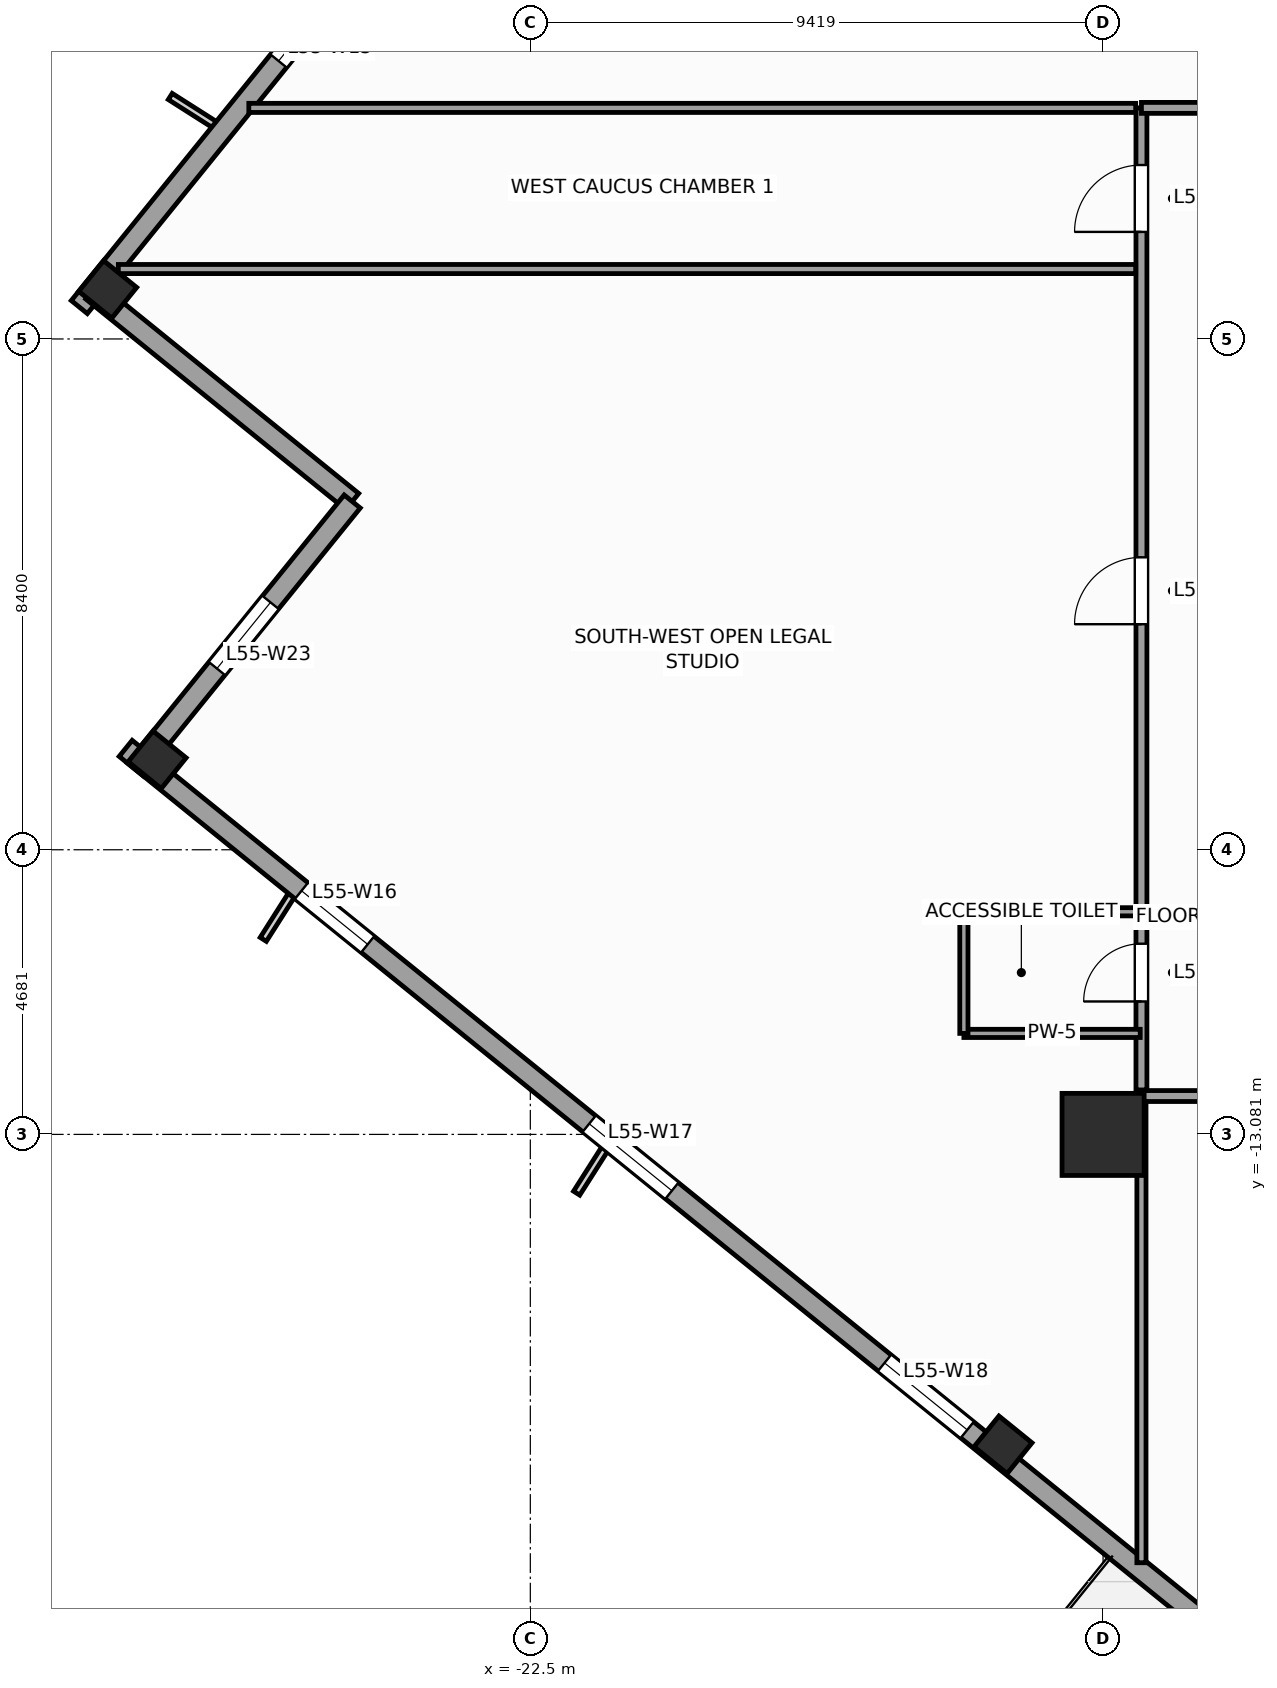
"""IFC4 building model, lengths in metres.
Left out: names, types, materials, properties, quantities, classifications, styles, units other than length and angle.
Written with IfcOpenShell. Run it as: python <this file> out.ifc"""

import sys

from ifc_helpers import new_model, si_unit, direction, frame, frame_2d, origin, origin_2d, place, context, subcontext, project, spatial, rectangle, extrude, source, transform, mapped, element, fill, save


model = new_model("IFC4")
c1 = context("Model", 3, precision=1e-05, world=origin(), true_north=direction((0.0, 1.0)))
c2 = subcontext(c1, "Body", "Model", "MODEL_VIEW")
j1 = project(units=[si_unit("LENGTHUNIT", "METRE"), si_unit("PLANEANGLEUNIT", "RADIAN")], contexts=[c1])
p1 = place(None, origin())
s1 = spatial("IfcSite", under=j1, at=p1, CompositionType="ELEMENT")
p2 = place(p1, origin())
s2 = spatial("IfcBuilding", under=s1, at=p2, CompositionType="ELEMENT")
p3 = place(p2, frame((0.0, 0.0, 229.0)))
s3 = spatial("IfcBuildingStorey", under=s2, at=p3, CompositionType="ELEMENT", Elevation=229.0)
m1 = source(origin(), c2, "Body", "SweptSolid", [
    extrude(rectangle(XDim=1.35, YDim=1.35, at=origin_2d()), origin(), (0.0, 0.0, 1.0), 3.9),
])
p4 = place(p3, frame((-13.081, -13.081, 0.0), z_axis=(0.0, 0.0, 1.0), x_axis=(1.0, 0.0, 0.0)))
e1 = element("IfcColumn", 1, at=p4, inside=s3, PredefinedType="COLUMN", context=c2, shape_type="MappedRepresentation", body=[
    mapped(m1, transform((0.0, 0.0, 0.0), scale=1.0)),
])
m2 = source(origin(), c2, "Body", "SweptSolid", [
    extrude(rectangle(XDim=0.65, YDim=0.7, at=origin_2d()), origin(), (0.0, 0.0, 1.0), 3.9),
])
for number, where, z_axis, x_axis in (
    (2, (-29.45, 0.815, 0.0), (0.0, 0.0, 1.0), (0.629, 0.777, 0.0)),
    (3, (-28.637, -6.92, 0.0), (0.0, 0.0, 1.0), (0.629, 0.777, 0.0)),
    (4, (-14.726, -18.185, 0.0), (0.0, 0.0, 1.0), (0.629, 0.777, 0.0)),
):
    element("IfcColumn", number, at=place(p3, frame(where, z_axis=z_axis, x_axis=x_axis)), inside=s3, PredefinedType="COLUMN", context=c2, shape_type="MappedRepresentation", body=[
        mapped(m2, transform((0.0, 0.0, 0.0), scale=1.0)),
    ])
p5 = place(p3, frame((-6.733, 29.154, 0.0), z_axis=(0.0, 0.0, 1.0), x_axis=(-0.629325378072, -0.77714192302, 0.0)))
e5 = element("IfcWall", 5, at=p5, inside=s3, PredefinedType="STANDARD", context=c2, shape_type="SweptSolid", body=[
    extrude(rectangle(XDim=36.84, YDim=0.34, at=frame_2d((18.42, 0.0))), origin(), (0.0, 0.0, 1.0), 2.96),
])
p6 = place(p5, frame((3.721, 0.0, 0.48)))
e6 = element("IfcOpeningElement", 6, at=p6, cuts=e5, PredefinedType="OPENING", context=c2, shape_type="SweptSolid", body=[
    extrude(rectangle(XDim=1.4, YDim=2.4, at=frame_2d((0.7, 1.2))), frame((0.0, 0.18, 0.0), z_axis=(0.0, -1.0, 0.0), x_axis=(1.0, 0.0, 0.0)), (0.0, 0.0, 1.0), 0.36),
])
p7 = place(p5, frame((9.809, 0.0, 0.58)))
e7 = element("IfcOpeningElement", 7, at=p7, cuts=e5, PredefinedType="OPENING", context=c2, shape_type="SweptSolid", body=[
    extrude(rectangle(XDim=1.75, YDim=2.3, at=frame_2d((0.875, 1.15))), frame((0.0, 0.18, 0.0), z_axis=(0.0, -1.0, 0.0), x_axis=(1.0, 0.0, 0.0)), (0.0, 0.0, 1.0), 0.36),
])
p8 = place(p5, frame((16.058, 0.0, 0.58)))
e8 = element("IfcOpeningElement", 8, at=p8, cuts=e5, PredefinedType="OPENING", context=c2, shape_type="SweptSolid", body=[
    extrude(rectangle(XDim=1.75, YDim=2.3, at=frame_2d((0.875, 1.15))), frame((0.0, 0.18, 0.0), z_axis=(0.0, -1.0, 0.0), x_axis=(1.0, 0.0, 0.0)), (0.0, 0.0, 1.0), 0.36),
])
p9 = place(p5, frame((24.176, 0.0, 0.58)))
e9 = element("IfcOpeningElement", 9, at=p9, cuts=e5, PredefinedType="OPENING", context=c2, shape_type="SweptSolid", body=[
    extrude(rectangle(XDim=1.75, YDim=2.3, at=frame_2d((0.875, 1.15))), frame((0.0, 0.18, 0.0), z_axis=(0.0, -1.0, 0.0), x_axis=(1.0, 0.0, 0.0)), (0.0, 0.0, 1.0), 0.36),
])
p10 = place(p5, frame((30.232, 0.0, 0.48)))
e10 = element("IfcOpeningElement", 10, at=p10, cuts=e5, PredefinedType="OPENING", context=c2, shape_type="SweptSolid", body=[
    extrude(rectangle(XDim=1.4, YDim=2.4, at=frame_2d((0.7, 1.2))), frame((0.0, 0.18, 0.0), z_axis=(0.0, -1.0, 0.0), x_axis=(1.0, 0.0, 0.0)), (0.0, 0.0, 1.0), 0.36),
])
p11 = place(p3, frame((-29.703, 0.789, 0.0), z_axis=(0.0, 0.0, 1.0), x_axis=(0.77714355312, -0.629323365087, 0.0)))
e11 = element("IfcWall", 11, at=p11, inside=s3, PredefinedType="STANDARD", context=c2, shape_type="SweptSolid", body=[
    extrude(rectangle(XDim=5.5, YDim=0.34, at=frame_2d((2.75, 0.0))), origin(), (0.0, 0.0, 1.0), 3.66),
])
p12 = place(p3, frame((-25.429, -2.673, 0.0), z_axis=(0.0, 0.0, 1.0), x_axis=(-0.629299794138, -0.777162640055, 0.0)))
e12 = element("IfcWall", 12, at=p12, inside=s3, PredefinedType="STANDARD", context=c2, shape_type="SweptSolid", body=[
    extrude(rectangle(XDim=5.67, YDim=0.34, at=frame_2d((2.835, 0.0))), origin(), (0.0, 0.0, 1.0), 3.66),
])
p13 = place(p12, frame((2.135, 0.0, 0.48)))
e13 = element("IfcOpeningElement", 13, at=p13, cuts=e12, PredefinedType="OPENING", context=c2, shape_type="SweptSolid", body=[
    extrude(rectangle(XDim=1.4, YDim=2.4, at=frame_2d((0.7, 1.2))), frame((0.0, 0.18, 0.0), z_axis=(0.0, -1.0, 0.0), x_axis=(1.0, 0.0, 0.0)), (0.0, 0.0, 1.0), 0.36),
])
p14 = place(p3, frame((-29.154, -6.733, 0.0), z_axis=(0.0, 0.0, 1.0), x_axis=(0.77714192302, -0.629325378072, 0.0)))
e14 = element("IfcWall", 14, at=p14, inside=s3, PredefinedType="STANDARD", context=c2, shape_type="SweptSolid", body=[
    extrude(rectangle(XDim=36.84, YDim=0.34, at=frame_2d((18.42, 0.0))), origin(), (0.0, 0.0, 1.0), 2.96),
])
p15 = place(p14, frame((23.495, 0.0, 0.0)))
e15 = element("IfcOpeningElement", 15, at=p15, cuts=e14, PredefinedType="OPENING", context=c2, shape_type="SweptSolid", body=[
    extrude(rectangle(XDim=1.05, YDim=2.25, at=frame_2d((0.525, 1.125))), frame((0.0, 0.18, 0.0), z_axis=(0.0, -1.0, 0.0), x_axis=(1.0, 0.0, 0.0)), (0.0, 0.0, 1.0), 0.36),
])
p16 = place(p14, frame((3.721, 0.0, 0.48)))
e16 = element("IfcOpeningElement", 16, at=p16, cuts=e14, PredefinedType="OPENING", context=c2, shape_type="SweptSolid", body=[
    extrude(rectangle(XDim=1.4, YDim=2.4, at=frame_2d((0.7, 1.2))), frame((0.0, 0.18, 0.0), z_axis=(0.0, -1.0, 0.0), x_axis=(1.0, 0.0, 0.0)), (0.0, 0.0, 1.0), 0.36),
])
p17 = place(p14, frame((9.809, 0.0, 0.58)))
e17 = element("IfcOpeningElement", 17, at=p17, cuts=e14, PredefinedType="OPENING", context=c2, shape_type="SweptSolid", body=[
    extrude(rectangle(XDim=1.75, YDim=2.3, at=frame_2d((0.875, 1.15))), frame((0.0, 0.18, 0.0), z_axis=(0.0, -1.0, 0.0), x_axis=(1.0, 0.0, 0.0)), (0.0, 0.0, 1.0), 0.36),
])
p18 = place(p14, frame((16.058, 0.0, 0.58)))
e18 = element("IfcOpeningElement", 18, at=p18, cuts=e14, PredefinedType="OPENING", context=c2, shape_type="SweptSolid", body=[
    extrude(rectangle(XDim=1.75, YDim=2.3, at=frame_2d((0.875, 1.15))), frame((0.0, 0.18, 0.0), z_axis=(0.0, -1.0, 0.0), x_axis=(1.0, 0.0, 0.0)), (0.0, 0.0, 1.0), 0.36),
])
p19 = place(p14, frame((25.676, 0.0, 0.58)))
e19 = element("IfcOpeningElement", 19, at=p19, cuts=e14, PredefinedType="OPENING", context=c2, shape_type="SweptSolid", body=[
    extrude(rectangle(XDim=1.75, YDim=2.3, at=frame_2d((0.875, 1.15))), frame((0.0, 0.18, 0.0), z_axis=(0.0, -1.0, 0.0), x_axis=(1.0, 0.0, 0.0)), (0.0, 0.0, 1.0), 0.36),
])
p20 = place(p14, frame((30.982, 0.0, 0.48)))
e20 = element("IfcOpeningElement", 20, at=p20, cuts=e14, PredefinedType="OPENING", context=c2, shape_type="SweptSolid", body=[
    extrude(rectangle(XDim=1.4, YDim=2.4, at=frame_2d((0.7, 1.2))), frame((0.0, 0.18, 0.0), z_axis=(0.0, -1.0, 0.0), x_axis=(1.0, 0.0, 0.0)), (0.0, 0.0, 1.0), 0.36),
])
p21 = place(p3, frame((-12.45, -12.45, 0.0), z_axis=(0.0, 0.0, 1.0), x_axis=(1.0, 0.0, 0.0)))
e21 = element("IfcWall", 21, at=p21, inside=s3, PredefinedType="PARTITIONING", context=c2, shape_type="SweptSolid", body=[
    extrude(rectangle(XDim=24.9, YDim=0.18, at=frame_2d((12.45, 0.0))), origin(), (0.0, 0.0, 1.0), 3.66),
])
p22 = place(p21, frame((4.839, 0.0, 0.0)))
e22 = element("IfcOpeningElement", 22, at=p22, cuts=e21, PredefinedType="OPENING", context=c2, shape_type="SweptSolid", body=[
    extrude(rectangle(XDim=1.1, YDim=2.2, at=frame_2d((0.55, 1.1))), frame((0.0, 0.1, 0.0), z_axis=(0.0, -1.0, 0.0), x_axis=(1.0, 0.0, 0.0)), (0.0, 0.0, 1.0), 0.2),
])
p23 = place(p21, frame((13.15, 0.0, 0.0)))
e23 = element("IfcOpeningElement", 23, at=p23, cuts=e21, PredefinedType="OPENING", context=c2, shape_type="SweptSolid", body=[
    extrude(rectangle(XDim=1.1, YDim=2.2, at=frame_2d((0.55, 1.1))), frame((0.0, 0.1, 0.0), z_axis=(0.0, -1.0, 0.0), x_axis=(1.0, 0.0, 0.0)), (0.0, 0.0, 1.0), 0.2),
])
p24 = place(p21, frame((20.21, 0.0, 0.0)))
e24 = element("IfcOpeningElement", 24, at=p24, cuts=e21, PredefinedType="OPENING", context=c2, shape_type="SweptSolid", body=[
    extrude(rectangle(XDim=1.1, YDim=2.2, at=frame_2d((0.55, 1.1))), frame((0.0, 0.1, 0.0), z_axis=(0.0, -1.0, 0.0), x_axis=(1.0, 0.0, 0.0)), (0.0, 0.0, 1.0), 0.2),
])
p25 = place(p3, frame((-12.45, -12.35, 0.0), z_axis=(0.0, 0.0, 1.0), x_axis=(0.0, 1.0, 0.0)))
e25 = element("IfcWall", 25, at=p25, inside=s3, PredefinedType="PARTITIONING", context=c2, shape_type="SweptSolid", body=[
    extrude(rectangle(XDim=16.15, YDim=0.18, at=frame_2d((8.075, 0.0))), origin(), (0.0, 0.0, 1.0), 3.66),
])
p26 = place(p25, frame((1.455, 0.0, 0.0)))
e26 = element("IfcOpeningElement", 26, at=p26, cuts=e25, PredefinedType="OPENING", context=c2, shape_type="SweptSolid", body=[
    extrude(rectangle(XDim=0.95, YDim=2.1, at=frame_2d((0.475, 1.05))), frame((0.0, 0.1, 0.0), z_axis=(0.0, -1.0, 0.0), x_axis=(1.0, 0.0, 0.0)), (0.0, 0.0, 1.0), 0.2),
])
p27 = place(p25, frame((14.111, 0.0, 0.0)))
e27 = element("IfcOpeningElement", 27, at=p27, cuts=e25, PredefinedType="OPENING", context=c2, shape_type="SweptSolid", body=[
    extrude(rectangle(XDim=1.1, YDim=2.2, at=frame_2d((0.55, 1.1))), frame((0.0, 0.1, 0.0), z_axis=(0.0, -1.0, 0.0), x_axis=(1.0, 0.0, 0.0)), (0.0, 0.0, 1.0), 0.2),
])
p28 = place(p25, frame((7.659, 0.0, 0.0)))
e28 = element("IfcOpeningElement", 28, at=p28, cuts=e25, PredefinedType="OPENING", context=c2, shape_type="SweptSolid", body=[
    extrude(rectangle(XDim=1.1, YDim=2.2, at=frame_2d((0.55, 1.1))), frame((0.0, 0.1, 0.0), z_axis=(0.0, -1.0, 0.0), x_axis=(1.0, 0.0, 0.0)), (0.0, 0.0, 1.0), 0.2),
])
p29 = place(p3, frame((-12.45, 3.8, 0.0), z_axis=(0.0, 0.0, 1.0), x_axis=(1.0, 0.0, 0.0)))
e29 = element("IfcWall", 29, at=p29, inside=s3, PredefinedType="PARTITIONING", context=c2, shape_type="SweptSolid", body=[
    extrude(rectangle(XDim=3.9, YDim=0.18, at=frame_2d((1.95, 0.0))), origin(), (0.0, 0.0, 1.0), 3.66),
])
p30 = place(p29, frame((1.4, 0.0, 0.0)))
e30 = element("IfcOpeningElement", 30, at=p30, cuts=e29, PredefinedType="OPENING", context=c2, shape_type="SweptSolid", body=[
    extrude(rectangle(XDim=1.1, YDim=2.2, at=frame_2d((0.55, 1.1))), frame((0.0, 0.1, 0.0), z_axis=(0.0, -1.0, 0.0), x_axis=(1.0, 0.0, 0.0)), (0.0, 0.0, 1.0), 0.2),
])
p31 = place(p3, frame((-29.275, 1.15, 0.0), z_axis=(0.0, 0.0, 1.0), x_axis=(1.0, 0.0, 0.0)))
e31 = element("IfcWall", 31, at=p31, inside=s3, PredefinedType="PARTITIONING", context=c2, shape_type="SweptSolid", body=[
    extrude(rectangle(XDim=16.73, YDim=0.15, at=frame_2d((8.365, 0.0))), origin(), (0.0, 0.0, 1.0), 3.66),
])
p32 = place(p3, frame((-27.129, 3.8, 0.0), z_axis=(0.0, 0.0, 1.0), x_axis=(1.0, 0.0, 0.0)))
e32 = element("IfcWall", 32, at=p32, inside=s3, PredefinedType="PARTITIONING", context=c2, shape_type="SweptSolid", body=[
    extrude(rectangle(XDim=14.584, YDim=0.15, at=frame_2d((7.292, 0.0))), origin(), (0.0, 0.0, 1.0), 3.66),
])
p33 = place(p3, frame((-12.45, -20.125, 0.0), z_axis=(0.0, 0.0, 1.0), x_axis=(0.0, 1.0, 0.0)))
e33 = element("IfcWall", 33, at=p33, inside=s3, PredefinedType="PARTITIONING", context=c2, shape_type="SweptSolid", body=[
    extrude(rectangle(XDim=7.58, YDim=0.15, at=frame_2d((3.79, 0.0))), origin(), (0.0, 0.0, 1.0), 3.66),
])
for number, where, z_axis, x_axis in (
    (34, (-15.37, -11.42, 0.0), (0.0, 0.0, 1.0), (1.0, 0.0, 0.0)),
    (35, (-15.37, -9.42, 0.0), (0.0, 0.0, 1.0), (1.0, 0.0, 0.0)),
):
    element("IfcWall", number, at=place(p3, frame(where, z_axis=z_axis, x_axis=x_axis)), inside=s3, PredefinedType="PARTITIONING", context=c2, shape_type="SweptSolid", body=[
        extrude(rectangle(XDim=2.9, YDim=0.135, at=frame_2d((1.45, 0.0))), origin(), (0.0, 0.0, 1.0), 3.66),
    ])
p34 = place(p3, frame((-15.37, -11.42, 0.0), z_axis=(0.0, 0.0, 1.0), x_axis=(0.0, 1.0, 0.0)))
e36 = element("IfcWall", 36, at=p34, inside=s3, PredefinedType="PARTITIONING", context=c2, shape_type="SweptSolid", body=[
    extrude(rectangle(XDim=2.0, YDim=0.135, at=frame_2d((1.0, 0.0))), origin(), (0.0, 0.0, 1.0), 3.66),
])
m3 = source(origin(), c2, "Body", "SweptSolid", [
    extrude(rectangle(XDim=1.4, YDim=2.4, at=frame_2d((0.7, 1.2))), frame((0.0, 0.03, 0.0), z_axis=(0.0, -1.0, 0.0), x_axis=(1.0, 0.0, 0.0)), (0.0, 0.0, 1.0), 0.06),
])
p35 = place(p10, origin())
e37 = element("IfcWindow", 37, at=p35, inside=s3, PartitioningType="SINGLE_PANEL", PredefinedType="WINDOW", context=c2, shape_type="MappedRepresentation", body=[
    mapped(m3, transform((0.0, 0.0, 0.0), scale=1.0)),
])
fill(e10, e37)
p36 = place(p16, origin())
e38 = element("IfcWindow", 38, at=p36, inside=s3, PartitioningType="SINGLE_PANEL", PredefinedType="WINDOW", context=c2, shape_type="MappedRepresentation", body=[
    mapped(m3, transform((0.0, 0.0, 0.0), scale=1.0)),
])
fill(e16, e38)
m4 = source(origin(), c2, "Body", "SweptSolid", [
    extrude(rectangle(XDim=1.75, YDim=2.3, at=frame_2d((0.875, 1.15))), frame((0.0, 0.03, 0.0), z_axis=(0.0, -1.0, 0.0), x_axis=(1.0, 0.0, 0.0)), (0.0, 0.0, 1.0), 0.06),
])
p37 = place(p17, origin())
e39 = element("IfcWindow", 39, at=p37, inside=s3, PartitioningType="SINGLE_PANEL", PredefinedType="WINDOW", context=c2, shape_type="MappedRepresentation", body=[
    mapped(m4, transform((0.0, 0.0, 0.0), scale=1.0)),
])
fill(e17, e39)
p38 = place(p18, origin())
e40 = element("IfcWindow", 40, at=p38, inside=s3, PartitioningType="SINGLE_PANEL", PredefinedType="WINDOW", context=c2, shape_type="MappedRepresentation", body=[
    mapped(m4, transform((0.0, 0.0, 0.0), scale=1.0)),
])
fill(e18, e40)
p39 = place(p13, origin())
e41 = element("IfcWindow", 41, at=p39, inside=s3, PartitioningType="SINGLE_PANEL", PredefinedType="WINDOW", context=c2, shape_type="MappedRepresentation", body=[
    mapped(m3, transform((0.0, 0.0, 0.0), scale=1.0)),
])
fill(e13, e41)
m5 = source(origin(), c2, "Body", "SweptSolid", [
    extrude(rectangle(XDim=0.95, YDim=2.1, at=frame_2d((0.475, 1.05))), frame((0.0, 0.025, 0.0), z_axis=(0.0, -1.0, 0.0), x_axis=(1.0, 0.0, 0.0)), (0.0, 0.0, 1.0), 0.05),
])
p40 = place(p26, origin())
e42 = element("IfcDoor", 42, at=p40, inside=s3, OperationType="SINGLE_SWING_LEFT", PredefinedType="DOOR", context=c2, shape_type="MappedRepresentation", body=[
    mapped(m5, transform((0.0, 0.0, 0.0), scale=1.0)),
])
fill(e26, e42)
m6 = source(origin(), c2, "Body", "SweptSolid", [
    extrude(rectangle(XDim=1.1, YDim=2.2, at=frame_2d((0.55, 1.1))), frame((0.0, 0.025, 0.0), z_axis=(0.0, -1.0, 0.0), x_axis=(1.0, 0.0, 0.0)), (0.0, 0.0, 1.0), 0.05),
])
p41 = place(p27, origin())
e43 = element("IfcDoor", 43, at=p41, inside=s3, OperationType="SINGLE_SWING_LEFT", PredefinedType="DOOR", context=c2, shape_type="MappedRepresentation", body=[
    mapped(m6, transform((0.0, 0.0, 0.0), scale=1.0)),
])
fill(e27, e43)
p42 = place(p28, origin())
e44 = element("IfcDoor", 44, at=p42, inside=s3, OperationType="SINGLE_SWING_LEFT", PredefinedType="DOOR", context=c2, shape_type="MappedRepresentation", body=[
    mapped(m6, transform((0.0, 0.0, 0.0), scale=1.0)),
])
fill(e28, e44)
save(model, sys.argv[1])
